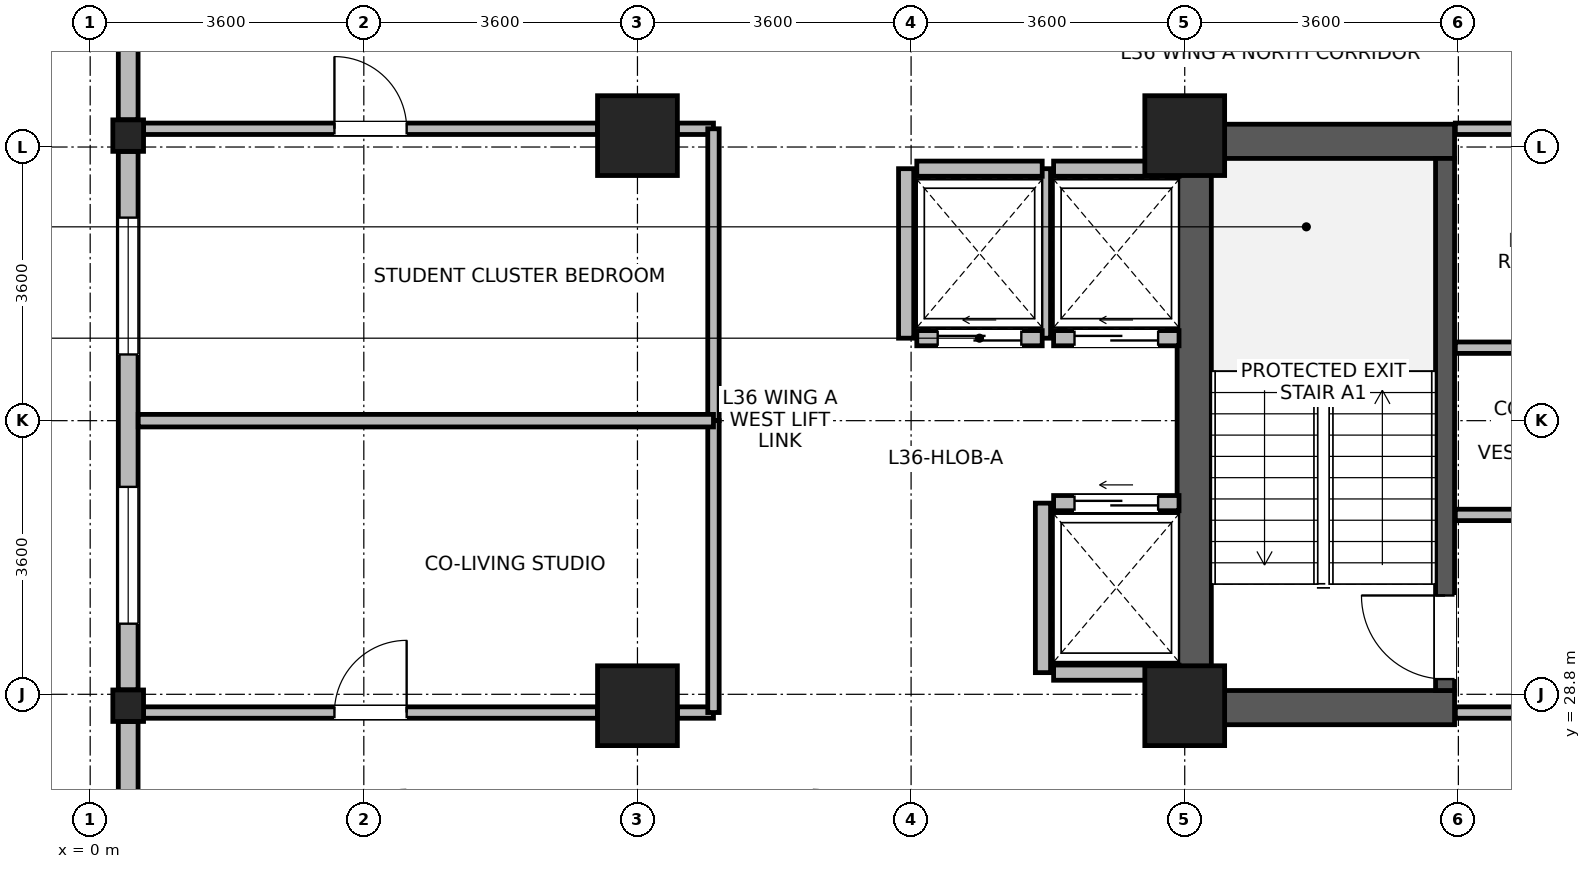
"""IFC4 building model, lengths in metres.
Left out: names, types, materials, properties, quantities, classifications, styles, units other than length and angle.
Written with IfcOpenShell. Run it as: python <this file> out.ifc"""

import sys

from ifc_helpers import new_model, si_unit, direction, frame, frame_2d, origin, origin_2d, place, context, subcontext, project, spatial, rectangle, i_section, extrude, source, transform, mapped, element, fill, save


model = new_model("IFC4")
c1 = context("Model", 3, precision=1e-05, world=origin(), true_north=direction((0.0, 1.0)))
c2 = subcontext(c1, "Body", "Model", "MODEL_VIEW")
j1 = project(units=[si_unit("LENGTHUNIT", "METRE"), si_unit("PLANEANGLEUNIT", "RADIAN")], contexts=[c1])
p1 = place(None, origin())
s1 = spatial("IfcSite", under=j1, at=p1, CompositionType="ELEMENT")
p2 = place(p1, origin())
s2 = spatial("IfcBuilding", under=s1, at=p2, CompositionType="ELEMENT")
p3 = place(p2, frame((0.0, 0.0, 143.9)))
s3 = spatial("IfcBuildingStorey", under=s2, at=p3, CompositionType="ELEMENT", Elevation=143.9)
p4 = place(p3, frame((14.525, 28.4, 0.0), z_axis=(0.0, 0.0, 1.0), x_axis=(0.0, 1.0, 0.0)))
e1 = element("IfcWall", 1, at=p4, inside=s3, PredefinedType="SHEAR", context=c2, shape_type="SweptSolid", body=[
    extrude(rectangle(XDim=7.9, YDim=0.45, at=frame_2d((3.95, 0.0))), origin(), (0.0, 0.0, 1.0), 3.46),
])
for number, where, z_axis, x_axis in (
    (2, (14.75, 28.625, 0.0), (0.0, 0.0, 1.0), (1.0, 0.0, 0.0)),
    (3, (14.75, 36.075, 0.0), (0.0, 0.0, 1.0), (1.0, 0.0, 0.0)),
):
    element("IfcWall", number, at=place(p3, frame(where, z_axis=z_axis, x_axis=x_axis)), inside=s3, PredefinedType="SHEAR", context=c2, shape_type="SweptSolid", body=[
        extrude(rectangle(XDim=3.2, YDim=0.45, at=frame_2d((1.6, 0.0))), origin(), (0.0, 0.0, 1.0), 3.46),
    ])
p5 = place(p3, frame((17.825, 28.85, 0.0), z_axis=(0.0, 0.0, 1.0), x_axis=(0.0, 1.0, 0.0)))
e4 = element("IfcWall", 4, at=p5, inside=s3, PredefinedType="SHEAR", context=c2, shape_type="SweptSolid", body=[
    extrude(rectangle(XDim=7.0, YDim=0.25, at=frame_2d((3.5, 0.0))), origin(), (0.0, 0.0, 1.0), 3.46),
])
p6 = place(p5, frame((0.15, 0.0, 0.0)))
e5 = element("IfcOpeningElement", 5, at=p6, cuts=e4, PredefinedType="OPENING", context=c2, shape_type="SweptSolid", body=[
    extrude(rectangle(XDim=1.1, YDim=2.08, at=frame_2d((0.55, 1.04))), frame((0.0, 0.135, 0.0), z_axis=(0.0, -1.0, 0.0), x_axis=(1.0, 0.0, 0.0)), (0.0, 0.0, 1.0), 0.27),
])
m1 = source(origin(), c2, "Body", "SweptSolid", [
    extrude(rectangle(XDim=1.05, YDim=1.05, at=origin_2d()), origin(), (0.0, 0.0, 1.0), 3.7),
])
for number, where, z_axis, x_axis in (
    (6, (7.2, 28.65, 0.0), (0.0, 0.0, 1.0), (1.0, 0.0, 0.0)),
    (7, (7.2, 36.15, 0.0), (0.0, 0.0, 1.0), (1.0, 0.0, 0.0)),
    (8, (14.4, 28.65, 0.0), (0.0, 0.0, 1.0), (1.0, 0.0, 0.0)),
    (9, (14.4, 36.15, 0.0), (0.0, 0.0, 1.0), (1.0, 0.0, 0.0)),
):
    element("IfcColumn", number, at=place(p3, frame(where, z_axis=z_axis, x_axis=x_axis)), inside=s3, PredefinedType="COLUMN", context=c2, shape_type="MappedRepresentation", body=[
        mapped(m1, transform((0.0, 0.0, 0.0), x_axis=(1.0, 0.0, 0.0), y_axis=(0.0, 1.0, 0.0), z_axis=(0.0, 0.0, 1.0), scale=1.0)),
    ])
m2 = source(origin(), c2, "Body", "SweptSolid", [
    extrude(i_section(OverallWidth=0.404, OverallDepth=0.414, WebThickness=0.021, FlangeThickness=0.028, FilletRadius=0.015, at=origin_2d()), origin(), (0.0, 0.0, 1.0), 3.7),
])
for number, where, z_axis, x_axis in (
    (10, (0.5, 28.65, 0.0), (0.0, 0.0, 1.0), (1.0, 0.0, 0.0)),
    (11, (0.5, 36.15, 0.0), (0.0, 0.0, 1.0), (1.0, 0.0, 0.0)),
):
    element("IfcColumn", number, at=place(p3, frame(where, z_axis=z_axis, x_axis=x_axis)), inside=s3, PredefinedType="COLUMN", context=c2, shape_type="MappedRepresentation", body=[
        mapped(m2, transform((0.0, 0.0, 0.0), x_axis=(1.0, 0.0, 0.0), y_axis=(0.0, 1.0, 0.0), z_axis=(0.0, 0.0, 1.0), scale=1.0)),
    ])
p7 = place(p3, frame((0.5, 36.358, 0.0), z_axis=(0.0, 0.0, 1.0), x_axis=(0.0, 1.0, 0.0)))
e12 = element("IfcWall", 12, at=p7, inside=s3, PredefinedType="STANDARD", context=c2, shape_type="SweptSolid", body=[
    extrude(rectangle(XDim=6.972, YDim=0.26, at=frame_2d((3.486, 0.0))), origin(), (0.0, 0.0, 1.0), 3.44),
])
p8 = place(p7, frame((4.329, 0.0, 0.85)))
e13 = element("IfcOpeningElement", 13, at=p8, cuts=e12, PredefinedType="OPENING", context=c2, shape_type="SweptSolid", body=[
    extrude(rectangle(XDim=1.8, YDim=1.85, at=frame_2d((0.9, 0.925))), frame((0.0, 0.14, 0.0), z_axis=(0.0, -1.0, 0.0), x_axis=(1.0, 0.0, 0.0)), (0.0, 0.0, 1.0), 0.28),
])
p9 = place(p7, frame((3.011, 0.0, 0.85)))
e14 = element("IfcOpeningElement", 14, at=p9, cuts=e12, PredefinedType="OPENING", context=c2, shape_type="SweptSolid", body=[
    extrude(rectangle(XDim=0.95, YDim=1.75, at=frame_2d((0.475, 0.875))), frame((0.0, 0.14, 0.0), z_axis=(0.0, -1.0, 0.0), x_axis=(1.0, 0.0, 0.0)), (0.0, 0.0, 1.0), 0.28),
])
p10 = place(p3, frame((0.5, 28.858, 0.0), z_axis=(0.0, 0.0, 1.0), x_axis=(0.0, 1.0, 0.0)))
e15 = element("IfcWall", 15, at=p10, inside=s3, PredefinedType="STANDARD", context=c2, shape_type="SweptSolid", body=[
    extrude(rectangle(XDim=7.084, YDim=0.26, at=frame_2d((3.542, 0.0))), origin(), (0.0, 0.0, 1.0), 2.99),
])
p11 = place(p10, frame((0.871, 0.0, 0.85)))
e16 = element("IfcOpeningElement", 16, at=p11, cuts=e15, PredefinedType="OPENING", context=c2, shape_type="SweptSolid", body=[
    extrude(rectangle(XDim=1.8, YDim=1.85, at=frame_2d((0.9, 0.925))), frame((0.0, 0.14, 0.0), z_axis=(0.0, -1.0, 0.0), x_axis=(1.0, 0.0, 0.0)), (0.0, 0.0, 1.0), 0.28),
])
p12 = place(p10, frame((4.413, 0.0, 0.85)))
e17 = element("IfcOpeningElement", 17, at=p12, cuts=e15, PredefinedType="OPENING", context=c2, shape_type="SweptSolid", body=[
    extrude(rectangle(XDim=1.8, YDim=1.85, at=frame_2d((0.9, 0.925))), frame((0.0, 0.14, 0.0), z_axis=(0.0, -1.0, 0.0), x_axis=(1.0, 0.0, 0.0)), (0.0, 0.0, 1.0), 0.28),
])
p13 = place(p3, frame((0.5, 21.47, 0.0), z_axis=(0.0, 0.0, 1.0), x_axis=(0.0, 1.0, 0.0)))
e18 = element("IfcWall", 18, at=p13, inside=s3, PredefinedType="STANDARD", context=c2, shape_type="SweptSolid", body=[
    extrude(rectangle(XDim=6.972, YDim=0.26, at=frame_2d((3.486, 0.0))), origin(), (0.0, 0.0, 1.0), 3.44),
])
p14 = place(p13, frame((0.843, 0.0, 0.85)))
e19 = element("IfcOpeningElement", 19, at=p14, cuts=e18, PredefinedType="OPENING", context=c2, shape_type="SweptSolid", body=[
    extrude(rectangle(XDim=1.8, YDim=1.85, at=frame_2d((0.9, 0.925))), frame((0.0, 0.14, 0.0), z_axis=(0.0, -1.0, 0.0), x_axis=(1.0, 0.0, 0.0)), (0.0, 0.0, 1.0), 0.28),
])
p15 = place(p13, frame((3.011, 0.0, 0.85)))
e20 = element("IfcOpeningElement", 20, at=p15, cuts=e18, PredefinedType="OPENING", context=c2, shape_type="SweptSolid", body=[
    extrude(rectangle(XDim=0.95, YDim=1.75, at=frame_2d((0.475, 0.875))), frame((0.0, 0.14, 0.0), z_axis=(0.0, -1.0, 0.0), x_axis=(1.0, 0.0, 0.0)), (0.0, 0.0, 1.0), 0.28),
])
p16 = place(p3, frame((12.675, 33.485, 0.0), z_axis=(0.0, 0.0, 1.0), x_axis=(1.0, 0.0, 0.0)))
e21 = element("IfcWall", 21, at=p16, inside=s3, PredefinedType="PARTITIONING", context=c2, shape_type="SweptSolid", body=[
    extrude(rectangle(XDim=1.65, YDim=0.2, at=frame_2d((0.825, 0.0))), origin(), (0.0, 0.0, 1.0), 3.44),
])
p17 = place(p16, frame((0.275, 0.0, 0.0)))
e22 = element("IfcOpeningElement", 22, at=p17, cuts=e21, PredefinedType="OPENING", context=c2, shape_type="SweptSolid", body=[
    extrude(rectangle(XDim=1.1, YDim=2.12, at=frame_2d((0.55, 1.06))), frame((0.0, 0.11, 0.0), z_axis=(0.0, -1.0, 0.0), x_axis=(1.0, 0.0, 0.0)), (0.0, 0.0, 1.0), 0.22),
])
p18 = place(p3, frame((12.675, 35.715, 0.0), z_axis=(0.0, 0.0, 1.0), x_axis=(1.0, 0.0, 0.0)))
e23 = element("IfcWall", 23, at=p18, inside=s3, PredefinedType="PARTITIONING", context=c2, shape_type="SweptSolid", body=[
    extrude(rectangle(XDim=1.65, YDim=0.2, at=frame_2d((0.825, 0.0))), origin(), (0.0, 0.0, 1.0), 3.44),
])
p19 = place(p3, frame((12.535, 33.485, 0.0), z_axis=(0.0, 0.0, 1.0), x_axis=(0.0, 1.0, 0.0)))
e24 = element("IfcWall", 24, at=p19, inside=s3, PredefinedType="PARTITIONING", context=c2, shape_type="SweptSolid", body=[
    extrude(rectangle(XDim=2.23, YDim=0.2, at=frame_2d((1.115, 0.0))), origin(), (0.0, 0.0, 1.0), 3.44),
])
p20 = place(p3, frame((12.675, 29.085, 0.0), z_axis=(0.0, 0.0, 1.0), x_axis=(1.0, 0.0, 0.0)))
e25 = element("IfcWall", 25, at=p20, inside=s3, PredefinedType="PARTITIONING", context=c2, shape_type="SweptSolid", body=[
    extrude(rectangle(XDim=1.65, YDim=0.2, at=frame_2d((0.825, 0.0))), origin(), (0.0, 0.0, 1.0), 3.44),
])
p21 = place(p3, frame((12.675, 31.315, 0.0), z_axis=(0.0, 0.0, 1.0), x_axis=(1.0, 0.0, 0.0)))
e26 = element("IfcWall", 26, at=p21, inside=s3, PredefinedType="PARTITIONING", context=c2, shape_type="SweptSolid", body=[
    extrude(rectangle(XDim=1.65, YDim=0.2, at=frame_2d((0.825, 0.0))), origin(), (0.0, 0.0, 1.0), 3.44),
])
p22 = place(p21, frame((0.275, 0.0, 0.0)))
e27 = element("IfcOpeningElement", 27, at=p22, cuts=e26, PredefinedType="OPENING", context=c2, shape_type="SweptSolid", body=[
    extrude(rectangle(XDim=1.1, YDim=2.12, at=frame_2d((0.55, 1.06))), frame((0.0, 0.11, 0.0), z_axis=(0.0, -1.0, 0.0), x_axis=(1.0, 0.0, 0.0)), (0.0, 0.0, 1.0), 0.22),
])
p23 = place(p3, frame((12.535, 29.085, 0.0), z_axis=(0.0, 0.0, 1.0), x_axis=(0.0, 1.0, 0.0)))
e28 = element("IfcWall", 28, at=p23, inside=s3, PredefinedType="PARTITIONING", context=c2, shape_type="SweptSolid", body=[
    extrude(rectangle(XDim=2.23, YDim=0.2, at=frame_2d((1.115, 0.0))), origin(), (0.0, 0.0, 1.0), 3.44),
])
p24 = place(p3, frame((10.875, 33.485, 0.0), z_axis=(0.0, 0.0, 1.0), x_axis=(1.0, 0.0, 0.0)))
e29 = element("IfcWall", 29, at=p24, inside=s3, PredefinedType="PARTITIONING", context=c2, shape_type="SweptSolid", body=[
    extrude(rectangle(XDim=1.65, YDim=0.2, at=frame_2d((0.825, 0.0))), origin(), (0.0, 0.0, 1.0), 3.44),
])
p25 = place(p24, frame((0.275, 0.0, 0.0)))
e30 = element("IfcOpeningElement", 30, at=p25, cuts=e29, PredefinedType="OPENING", context=c2, shape_type="SweptSolid", body=[
    extrude(rectangle(XDim=1.1, YDim=2.12, at=frame_2d((0.55, 1.06))), frame((0.0, 0.11, 0.0), z_axis=(0.0, -1.0, 0.0), x_axis=(1.0, 0.0, 0.0)), (0.0, 0.0, 1.0), 0.22),
])
p26 = place(p3, frame((10.875, 35.715, 0.0), z_axis=(0.0, 0.0, 1.0), x_axis=(1.0, 0.0, 0.0)))
e31 = element("IfcWall", 31, at=p26, inside=s3, PredefinedType="PARTITIONING", context=c2, shape_type="SweptSolid", body=[
    extrude(rectangle(XDim=1.65, YDim=0.2, at=frame_2d((0.825, 0.0))), origin(), (0.0, 0.0, 1.0), 3.44),
])
p27 = place(p3, frame((10.735, 33.485, 0.0), z_axis=(0.0, 0.0, 1.0), x_axis=(0.0, 1.0, 0.0)))
e32 = element("IfcWall", 32, at=p27, inside=s3, PredefinedType="PARTITIONING", context=c2, shape_type="SweptSolid", body=[
    extrude(rectangle(XDim=2.23, YDim=0.2, at=frame_2d((1.115, 0.0))), origin(), (0.0, 0.0, 1.0), 3.44),
])
p28 = place(p3, frame((0.702, 28.56, 0.0), z_axis=(0.0, 0.0, 1.0), x_axis=(1.0, 0.0, 0.0)))
e33 = element("IfcWall", 33, at=p28, inside=s3, PredefinedType="PARTITIONING", context=c2, shape_type="SweptSolid", body=[
    extrude(rectangle(XDim=5.973, YDim=0.15, at=frame_2d((2.987, 0.0))), origin(), (0.0, 0.0, 1.0), 2.84),
])
p29 = place(p28, frame((2.511, 0.0, 0.0)))
e34 = element("IfcOpeningElement", 34, at=p29, cuts=e33, PredefinedType="OPENING", context=c2, shape_type="SweptSolid", body=[
    extrude(rectangle(XDim=0.95, YDim=2.1, at=frame_2d((0.475, 1.05))), frame((0.0, 0.085, 0.0), z_axis=(0.0, -1.0, 0.0), x_axis=(1.0, 0.0, 0.0)), (0.0, 0.0, 1.0), 0.17),
])
p30 = place(p3, frame((7.725, 28.56, 0.0), z_axis=(0.0, 0.0, 1.0), x_axis=(1.0, 0.0, 0.0)))
e35 = element("IfcWall", 35, at=p30, inside=s3, PredefinedType="PARTITIONING", context=c2, shape_type="SweptSolid", body=[
    extrude(rectangle(XDim=0.475, YDim=0.15, at=frame_2d((0.237, 0.0))), origin(), (0.0, 0.0, 1.0), 2.84),
])
p31 = place(p3, frame((0.702, 36.24, 0.0), z_axis=(0.0, 0.0, 1.0), x_axis=(1.0, 0.0, 0.0)))
e36 = element("IfcWall", 36, at=p31, inside=s3, PredefinedType="PARTITIONING", context=c2, shape_type="SweptSolid", body=[
    extrude(rectangle(XDim=5.973, YDim=0.15, at=frame_2d((2.987, 0.0))), origin(), (0.0, 0.0, 1.0), 2.84),
])
p32 = place(p31, frame((2.511, 0.0, 0.0)))
e37 = element("IfcOpeningElement", 37, at=p32, cuts=e36, PredefinedType="OPENING", context=c2, shape_type="SweptSolid", body=[
    extrude(rectangle(XDim=0.95, YDim=2.1, at=frame_2d((0.475, 1.05))), frame((0.0, 0.085, 0.0), z_axis=(0.0, -1.0, 0.0), x_axis=(1.0, 0.0, 0.0)), (0.0, 0.0, 1.0), 0.17),
])
p33 = place(p3, frame((7.725, 36.24, 0.0), z_axis=(0.0, 0.0, 1.0), x_axis=(1.0, 0.0, 0.0)))
e38 = element("IfcWall", 38, at=p33, inside=s3, PredefinedType="PARTITIONING", context=c2, shape_type="SweptSolid", body=[
    extrude(rectangle(XDim=0.475, YDim=0.15, at=frame_2d((0.237, 0.0))), origin(), (0.0, 0.0, 1.0), 2.84),
])
p34 = place(p3, frame((8.2, 32.4, 0.0), z_axis=(0.0, 0.0, 1.0), x_axis=(0.0, 1.0, 0.0)))
e39 = element("IfcWall", 39, at=p34, inside=s3, PredefinedType="PARTITIONING", context=c2, shape_type="SweptSolid", body=[
    extrude(rectangle(XDim=3.84, YDim=0.15, at=frame_2d((1.92, 0.0))), origin(), (0.0, 0.0, 1.0), 3.44),
])
p35 = place(p3, frame((8.2, 28.56, 0.0), z_axis=(0.0, 0.0, 1.0), x_axis=(0.0, 1.0, 0.0)))
e40 = element("IfcWall", 40, at=p35, inside=s3, PredefinedType="PARTITIONING", context=c2, shape_type="SweptSolid", body=[
    extrude(rectangle(XDim=3.84, YDim=0.15, at=frame_2d((1.92, 0.0))), origin(), (0.0, 0.0, 1.0), 3.44),
])
p36 = place(p3, frame((17.96, 36.24, 0.0), z_axis=(0.0, 0.0, 1.0), x_axis=(1.0, 0.0, 0.0)))
e41 = element("IfcWall", 41, at=p36, inside=s3, PredefinedType="PARTITIONING", context=c2, shape_type="SweptSolid", body=[
    extrude(rectangle(XDim=3.68, YDim=0.15, at=frame_2d((1.84, 0.0))), origin(), (0.0, 0.0, 1.0), 2.44),
])
p37 = place(p36, frame((1.415, 0.0, 0.0)))
e42 = element("IfcOpeningElement", 42, at=p37, cuts=e41, PredefinedType="OPENING", context=c2, shape_type="SweptSolid", body=[
    extrude(rectangle(XDim=0.85, YDim=2.04, at=frame_2d((0.425, 1.02))), frame((0.0, 0.085, 0.0), z_axis=(0.0, -1.0, 0.0), x_axis=(1.0, 0.0, 0.0)), (0.0, 0.0, 1.0), 0.17),
])
p38 = place(p3, frame((17.96, 28.56, 0.0), z_axis=(0.0, 0.0, 1.0), x_axis=(1.0, 0.0, 0.0)))
e43 = element("IfcWall", 43, at=p38, inside=s3, PredefinedType="PARTITIONING", context=c2, shape_type="SweptSolid", body=[
    extrude(rectangle(XDim=2.0, YDim=0.15, at=frame_2d((1.0, 0.0))), origin(), (0.0, 0.0, 1.0), 2.44),
])
for number, where, z_axis, x_axis in (
    (44, (17.96, 31.16, 0.0), (0.0, 0.0, 1.0), (1.0, 0.0, 0.0)),
    (45, (17.96, 33.36, 0.0), (0.0, 0.0, 1.0), (1.0, 0.0, 0.0)),
):
    element("IfcWall", number, at=place(p3, frame(where, z_axis=z_axis, x_axis=x_axis)), inside=s3, PredefinedType="PARTITIONING", context=c2, shape_type="SweptSolid", body=[
        extrude(rectangle(XDim=2.0, YDim=0.15, at=frame_2d((1.0, 0.0))), origin(), (0.0, 0.0, 1.0), 3.44),
    ])
p39 = place(p3, frame((0.632, 32.4, 0.0), z_axis=(0.0, 0.0, 1.0), x_axis=(1.0, 0.0, 0.0)))
e46 = element("IfcWall", 46, at=p39, inside=s3, PredefinedType="PARTITIONING", context=c2, shape_type="SweptSolid", body=[
    extrude(rectangle(XDim=7.568, YDim=0.165, at=frame_2d((3.784, 0.0))), origin(), (0.0, 0.0, 1.0), 3.44),
])
p40 = place(p11, origin())
e47 = element("IfcWindow", 47, at=p40, inside=s3, PartitioningType="SINGLE_PANEL", PredefinedType="WINDOW", context=c2, shape_type="SweptSolid", body=[
    extrude(rectangle(XDim=1.8, YDim=1.85, at=frame_2d((0.9, 0.925))), frame((0.0, 0.03, 0.0), z_axis=(0.0, -1.0, 0.0), x_axis=(1.0, 0.0, 0.0)), (0.0, 0.0, 1.0), 0.06),
])
fill(e16, e47)
p41 = place(p12, origin())
e48 = element("IfcWindow", 48, at=p41, inside=s3, PartitioningType="SINGLE_PANEL", PredefinedType="WINDOW", context=c2, shape_type="SweptSolid", body=[
    extrude(rectangle(XDim=1.8, YDim=1.85, at=frame_2d((0.9, 0.925))), frame((0.0, 0.03, 0.0), z_axis=(0.0, -1.0, 0.0), x_axis=(1.0, 0.0, 0.0)), (0.0, 0.0, 1.0), 0.06),
])
fill(e17, e48)
p42 = place(p6, origin())
e49 = element("IfcDoor", 49, at=p42, inside=s3, OperationType="SINGLE_SWING_RIGHT", PredefinedType="DOOR", context=c2, shape_type="SweptSolid", body=[
    extrude(rectangle(XDim=1.1, YDim=2.08, at=frame_2d((0.55, 1.04))), frame((0.0, 0.025, 0.0), z_axis=(0.0, -1.0, 0.0), x_axis=(1.0, 0.0, 0.0)), (0.0, 0.0, 1.0), 0.05),
])
fill(e5, e49)
p43 = place(p17, origin())
e50 = element("IfcDoor", 50, at=p43, inside=s3, OperationType="SLIDING_TO_LEFT", PredefinedType="DOOR", context=c2, shape_type="SweptSolid", body=[
    extrude(rectangle(XDim=1.1, YDim=2.12, at=frame_2d((0.55, 1.06))), frame((0.0, 0.025, 0.0), z_axis=(0.0, -1.0, 0.0), x_axis=(1.0, 0.0, 0.0)), (0.0, 0.0, 1.0), 0.05),
])
fill(e22, e50)
p44 = place(p22, origin())
e51 = element("IfcDoor", 51, at=p44, inside=s3, OperationType="SLIDING_TO_LEFT", PredefinedType="DOOR", context=c2, shape_type="SweptSolid", body=[
    extrude(rectangle(XDim=1.1, YDim=2.12, at=frame_2d((0.55, 1.06))), frame((0.0, 0.025, 0.0), z_axis=(0.0, -1.0, 0.0), x_axis=(1.0, 0.0, 0.0)), (0.0, 0.0, 1.0), 0.05),
])
fill(e27, e51)
p45 = place(p25, origin())
e52 = element("IfcDoor", 52, at=p45, inside=s3, OperationType="SLIDING_TO_LEFT", PredefinedType="DOOR", context=c2, shape_type="SweptSolid", body=[
    extrude(rectangle(XDim=1.1, YDim=2.12, at=frame_2d((0.55, 1.06))), frame((0.0, 0.025, 0.0), z_axis=(0.0, -1.0, 0.0), x_axis=(1.0, 0.0, 0.0)), (0.0, 0.0, 1.0), 0.05),
])
fill(e30, e52)
p46 = place(p29, origin())
e53 = element("IfcDoor", 53, at=p46, inside=s3, OperationType="SINGLE_SWING_RIGHT", PredefinedType="DOOR", context=c2, shape_type="SweptSolid", body=[
    extrude(rectangle(XDim=0.95, YDim=2.1, at=frame_2d((0.475, 1.05))), frame((0.0, 0.025, 0.0), z_axis=(0.0, -1.0, 0.0), x_axis=(1.0, 0.0, 0.0)), (0.0, 0.0, 1.0), 0.05),
])
fill(e34, e53)
p47 = place(p32, origin())
e54 = element("IfcDoor", 54, at=p47, inside=s3, OperationType="SINGLE_SWING_LEFT", PredefinedType="DOOR", context=c2, shape_type="SweptSolid", body=[
    extrude(rectangle(XDim=0.95, YDim=2.1, at=frame_2d((0.475, 1.05))), frame((0.0, 0.025, 0.0), z_axis=(0.0, -1.0, 0.0), x_axis=(1.0, 0.0, 0.0)), (0.0, 0.0, 1.0), 0.05),
])
fill(e37, e54)
save(model, sys.argv[1])
